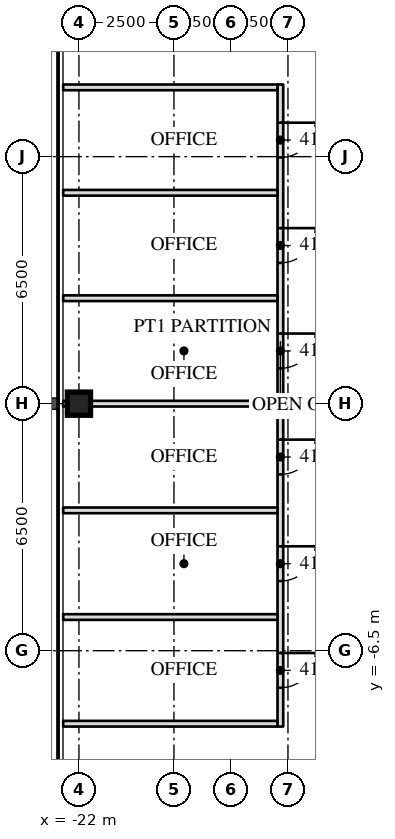
"""IFC4 building model, lengths in metres.
Left out: names, types, materials, properties, quantities, classifications, styles, units other than length and angle.
Written with IfcOpenShell. Run it as: python <this file> out.ifc"""

import sys

from ifc_helpers import new_model, si_unit, direction, frame, frame_2d, origin, origin_2d, place, context, subcontext, project, spatial, rectangle, hollow_rectangle, extrude, element, fill, save


model = new_model("IFC4")
c1 = context("Model", 3, precision=1e-05, world=origin(), true_north=direction((0.0, 1.0)))
c2 = subcontext(c1, "Body", "Model", "MODEL_VIEW")
j1 = project(units=[si_unit("LENGTHUNIT", "METRE"), si_unit("PLANEANGLEUNIT", "RADIAN")], contexts=[c1])
p1 = place(None, origin())
s1 = spatial("IfcSite", under=j1, at=p1, CompositionType="ELEMENT")
p2 = place(p1, origin())
s2 = spatial("IfcBuilding", under=s1, at=p2, CompositionType="ELEMENT")
p3 = place(p2, frame((0.0, 0.0, 174.6)))
s3 = spatial("IfcBuildingStorey", under=s2, at=p3, CompositionType="ELEMENT", Elevation=174.6)
p4 = place(p3, frame((-22.0, 0.0, 0.0), z_axis=(0.0, 0.0, 1.0), x_axis=(0.0, 1.0, 0.0)))
e1 = element("IfcColumn", 1, at=p4, inside=s3, PredefinedType="COLUMN", context=c2, shape_type="SweptSolid", body=[
    extrude(hollow_rectangle(XDim=0.61, YDim=0.61, WallThickness=0.076, at=origin_2d()), origin(), (0.0, 0.0, 1.0), 4.1),
])
p5 = place(p3, frame((-16.7, 8.398, 0.0), z_axis=(0.0, 0.0, 1.0), x_axis=(0.0, -1.0, 0.0)))
e2 = element("IfcWall", 2, at=p5, inside=s3, PredefinedType="PARTITIONING", context=c2, shape_type="SweptSolid", body=[
    extrude(rectangle(XDim=16.894, YDim=0.15, at=frame_2d((8.447, 0.0))), origin(), (0.0, 0.0, 1.0), 3.91),
])
p6 = place(p5, frame((1.004, 0.0, 0.0)))
e3 = element("IfcOpeningElement", 3, at=p6, cuts=e2, PredefinedType="OPENING", context=c2, shape_type="SweptSolid", body=[
    extrude(rectangle(XDim=0.915, YDim=2.134, at=frame_2d((0.458, 1.067))), frame((0.0, 0.085, 0.0), z_axis=(0.0, -1.0, 0.0), x_axis=(1.0, 0.0, 0.0)), (0.0, 0.0, 1.0), 0.17),
])
p7 = place(p5, frame((3.779, 0.0, 0.0)))
e4 = element("IfcOpeningElement", 4, at=p7, cuts=e2, PredefinedType="OPENING", context=c2, shape_type="SweptSolid", body=[
    extrude(rectangle(XDim=0.915, YDim=2.134, at=frame_2d((0.458, 1.067))), frame((0.0, 0.085, 0.0), z_axis=(0.0, -1.0, 0.0), x_axis=(1.0, 0.0, 0.0)), (0.0, 0.0, 1.0), 0.17),
])
p8 = place(p5, frame((6.553, 0.0, 0.0)))
e5 = element("IfcOpeningElement", 5, at=p8, cuts=e2, PredefinedType="OPENING", context=c2, shape_type="SweptSolid", body=[
    extrude(rectangle(XDim=0.915, YDim=2.134, at=frame_2d((0.458, 1.067))), frame((0.0, 0.085, 0.0), z_axis=(0.0, -1.0, 0.0), x_axis=(1.0, 0.0, 0.0)), (0.0, 0.0, 1.0), 0.17),
])
p9 = place(p5, frame((9.344, 0.0, 0.0)))
e6 = element("IfcOpeningElement", 6, at=p9, cuts=e2, PredefinedType="OPENING", context=c2, shape_type="SweptSolid", body=[
    extrude(rectangle(XDim=0.915, YDim=2.134, at=frame_2d((0.458, 1.067))), frame((0.0, 0.085, 0.0), z_axis=(0.0, -1.0, 0.0), x_axis=(1.0, 0.0, 0.0)), (0.0, 0.0, 1.0), 0.17),
])
p10 = place(p5, frame((12.151, 0.0, 0.0)))
e7 = element("IfcOpeningElement", 7, at=p10, cuts=e2, PredefinedType="OPENING", context=c2, shape_type="SweptSolid", body=[
    extrude(rectangle(XDim=0.915, YDim=2.134, at=frame_2d((0.458, 1.067))), frame((0.0, 0.085, 0.0), z_axis=(0.0, -1.0, 0.0), x_axis=(1.0, 0.0, 0.0)), (0.0, 0.0, 1.0), 0.17),
])
p11 = place(p5, frame((14.958, 0.0, 0.0)))
e8 = element("IfcOpeningElement", 8, at=p11, cuts=e2, PredefinedType="OPENING", context=c2, shape_type="SweptSolid", body=[
    extrude(rectangle(XDim=0.915, YDim=2.134, at=frame_2d((0.458, 1.067))), frame((0.0, 0.085, 0.0), z_axis=(0.0, -1.0, 0.0), x_axis=(1.0, 0.0, 0.0)), (0.0, 0.0, 1.0), 0.17),
])
for number, where, z_axis, x_axis in (
    (9, (-16.775, 8.323, 0.0), (0.0, 0.0, 1.0), (-1.0, 0.0, 0.0)),
    (10, (-16.775, 5.549, 0.0), (0.0, 0.0, 1.0), (-1.0, 0.0, 0.0)),
    (11, (-16.775, 2.775, 0.0), (0.0, 0.0, 1.0), (-1.0, 0.0, 0.0)),
):
    element("IfcWall", number, at=place(p3, frame(where, z_axis=z_axis, x_axis=x_axis)), inside=s3, PredefinedType="PARTITIONING", context=c2, shape_type="SweptSolid", body=[
        extrude(rectangle(XDim=5.64, YDim=0.15, at=frame_2d((2.82, 0.0))), origin(), (0.0, 0.0, 1.0), 3.91),
    ])
p12 = place(p3, frame((-16.775, 0.0, 0.0), z_axis=(0.0, 0.0, 1.0), x_axis=(-1.0, 0.0, 0.0)))
e12 = element("IfcWall", 12, at=p12, inside=s3, PredefinedType="PARTITIONING", context=c2, shape_type="SweptSolid", body=[
    extrude(rectangle(XDim=5.64, YDim=0.15, at=frame_2d((2.82, 0.0))), origin(), (0.0, 0.0, 1.0), 3.3),
])
for number, where, z_axis, x_axis in (
    (13, (-16.775, -2.807, 0.0), (0.0, 0.0, 1.0), (-1.0, 0.0, 0.0)),
    (14, (-16.775, -5.614, 0.0), (0.0, 0.0, 1.0), (-1.0, 0.0, 0.0)),
    (15, (-16.775, -8.421, 0.0), (0.0, 0.0, 1.0), (-1.0, 0.0, 0.0)),
):
    element("IfcWall", number, at=place(p3, frame(where, z_axis=z_axis, x_axis=x_axis)), inside=s3, PredefinedType="PARTITIONING", context=c2, shape_type="SweptSolid", body=[
        extrude(rectangle(XDim=5.64, YDim=0.15, at=frame_2d((2.82, 0.0))), origin(), (0.0, 0.0, 1.0), 3.91),
    ])
p13 = place(p6, origin())
e16 = element("IfcDoor", 16, at=p13, inside=s3, OperationType="SINGLE_SWING_LEFT", PredefinedType="DOOR", context=c2, shape_type="SweptSolid", body=[
    extrude(rectangle(XDim=0.915, YDim=2.134, at=frame_2d((0.458, 1.067))), frame((0.0, 0.025, 0.0), z_axis=(0.0, -1.0, 0.0), x_axis=(1.0, 0.0, 0.0)), (0.0, 0.0, 1.0), 0.05),
])
fill(e3, e16)
p14 = place(p7, origin())
e17 = element("IfcDoor", 17, at=p14, inside=s3, OperationType="SINGLE_SWING_LEFT", PredefinedType="DOOR", context=c2, shape_type="SweptSolid", body=[
    extrude(rectangle(XDim=0.915, YDim=2.134, at=frame_2d((0.458, 1.067))), frame((0.0, 0.025, 0.0), z_axis=(0.0, -1.0, 0.0), x_axis=(1.0, 0.0, 0.0)), (0.0, 0.0, 1.0), 0.05),
])
fill(e4, e17)
p15 = place(p8, origin())
e18 = element("IfcDoor", 18, at=p15, inside=s3, OperationType="SINGLE_SWING_LEFT", PredefinedType="DOOR", context=c2, shape_type="SweptSolid", body=[
    extrude(rectangle(XDim=0.915, YDim=2.134, at=frame_2d((0.458, 1.067))), frame((0.0, 0.025, 0.0), z_axis=(0.0, -1.0, 0.0), x_axis=(1.0, 0.0, 0.0)), (0.0, 0.0, 1.0), 0.05),
])
fill(e5, e18)
p16 = place(p9, origin())
e19 = element("IfcDoor", 19, at=p16, inside=s3, OperationType="SINGLE_SWING_LEFT", PredefinedType="DOOR", context=c2, shape_type="SweptSolid", body=[
    extrude(rectangle(XDim=0.915, YDim=2.134, at=frame_2d((0.458, 1.067))), frame((0.0, 0.025, 0.0), z_axis=(0.0, -1.0, 0.0), x_axis=(1.0, 0.0, 0.0)), (0.0, 0.0, 1.0), 0.05),
])
fill(e6, e19)
p17 = place(p10, origin())
e20 = element("IfcDoor", 20, at=p17, inside=s3, OperationType="SINGLE_SWING_LEFT", PredefinedType="DOOR", context=c2, shape_type="SweptSolid", body=[
    extrude(rectangle(XDim=0.915, YDim=2.134, at=frame_2d((0.458, 1.067))), frame((0.0, 0.025, 0.0), z_axis=(0.0, -1.0, 0.0), x_axis=(1.0, 0.0, 0.0)), (0.0, 0.0, 1.0), 0.05),
])
fill(e7, e20)
p18 = place(p11, origin())
e21 = element("IfcDoor", 21, at=p18, inside=s3, OperationType="SINGLE_SWING_LEFT", PredefinedType="DOOR", context=c2, shape_type="SweptSolid", body=[
    extrude(rectangle(XDim=0.915, YDim=2.134, at=frame_2d((0.458, 1.067))), frame((0.0, 0.025, 0.0), z_axis=(0.0, -1.0, 0.0), x_axis=(1.0, 0.0, 0.0)), (0.0, 0.0, 1.0), 0.05),
])
fill(e8, e21)
save(model, sys.argv[1])
